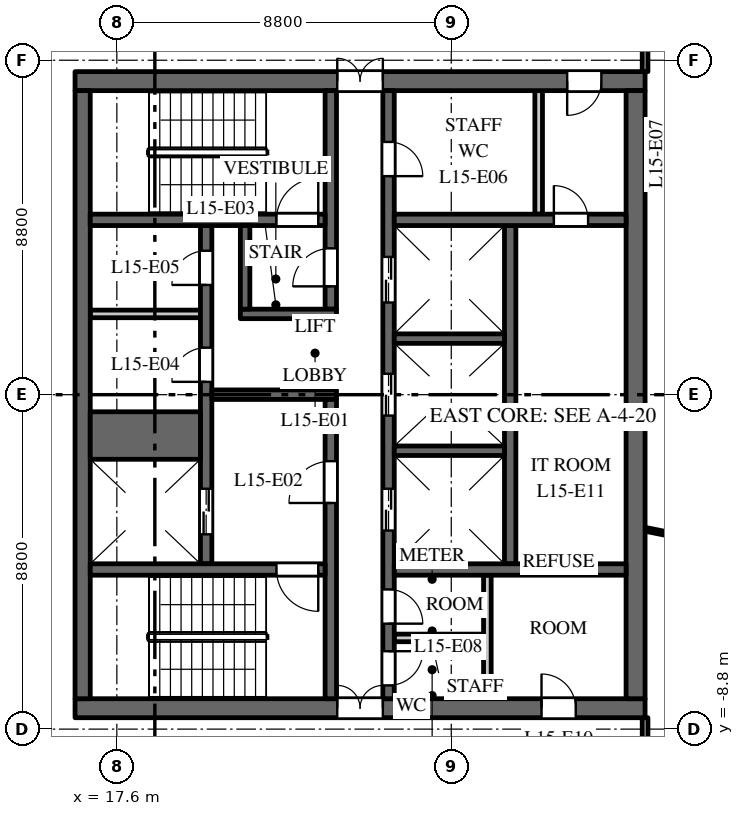
"""IFC4 building model, lengths in metres.
Left out: names, types, materials, properties, quantities, classifications, styles, units other than length and angle.
Written with IfcOpenShell. Run it as: python <this file> out.ifc"""

import sys

from ifc_helpers import new_model, si_unit, direction, frame, frame_2d, origin, place, context, subcontext, project, spatial, rectangle, extrude, element, fill, save


model = new_model("IFC4")
c1 = context("Model", 3, precision=1e-05, world=origin(), true_north=direction((0.0, 1.0)))
c2 = subcontext(c1, "Body", "Model", "MODEL_VIEW")
j1 = project(units=[si_unit("LENGTHUNIT", "METRE"), si_unit("PLANEANGLEUNIT", "RADIAN")], contexts=[c1])
p1 = place(None, origin())
s1 = spatial("IfcSite", under=j1, at=p1, CompositionType="ELEMENT")
p2 = place(p1, origin())
s2 = spatial("IfcBuilding", under=s1, at=p2, CompositionType="ELEMENT")
p3 = place(p2, frame((0.0, 0.0, 70.5)))
s3 = spatial("IfcBuildingStorey", under=s2, at=p3, CompositionType="ELEMENT", Elevation=70.5)
p4 = place(p3, frame((16.5, 8.25, 0.0), z_axis=(0.0, 0.0, 1.0), x_axis=(1.0, 0.0, 0.0)))
e1 = element("IfcWall", 1, at=p4, inside=s3, PredefinedType="SHEAR", context=c2, shape_type="SweptSolid", body=[
    extrude(rectangle(XDim=15.0, YDim=0.5, at=frame_2d((7.5, 0.0))), origin(), (0.0, 0.0, 1.0), 3.7),
])
p5 = place(p4, frame((6.9, 0.0, 0.0)))
e2 = element("IfcOpeningElement", 2, at=p5, cuts=e1, PredefinedType="OPENING", context=c2, shape_type="SweptSolid", body=[
    extrude(rectangle(XDim=1.2, YDim=2.1, at=frame_2d((0.6, 1.05))), frame((0.0, 0.26, 0.0), z_axis=(0.0, -1.0, 0.0), x_axis=(1.0, 0.0, 0.0)), (0.0, 0.0, 1.0), 0.52),
])
p6 = place(p4, frame((12.95, 0.0, 0.0)))
e3 = element("IfcOpeningElement", 3, at=p6, cuts=e1, PredefinedType="OPENING", context=c2, shape_type="SweptSolid", body=[
    extrude(rectangle(XDim=0.9, YDim=2.1, at=frame_2d((0.45, 1.05))), frame((0.0, 0.26, 0.0), z_axis=(0.0, -1.0, 0.0), x_axis=(1.0, 0.0, 0.0)), (0.0, 0.0, 1.0), 0.52),
])
p7 = place(p3, frame((16.5, -8.25, 0.0), z_axis=(0.0, 0.0, 1.0), x_axis=(1.0, 0.0, 0.0)))
e4 = element("IfcWall", 4, at=p7, inside=s3, PredefinedType="SHEAR", context=c2, shape_type="SweptSolid", body=[
    extrude(rectangle(XDim=15.0, YDim=0.5, at=frame_2d((7.5, 0.0))), origin(), (0.0, 0.0, 1.0), 3.7),
])
p8 = place(p7, frame((6.9, 0.0, 0.0)))
e5 = element("IfcOpeningElement", 5, at=p8, cuts=e4, PredefinedType="OPENING", context=c2, shape_type="SweptSolid", body=[
    extrude(rectangle(XDim=1.2, YDim=2.1, at=frame_2d((0.6, 1.05))), frame((0.0, 0.26, 0.0), z_axis=(0.0, -1.0, 0.0), x_axis=(1.0, 0.0, 0.0)), (0.0, 0.0, 1.0), 0.52),
])
p9 = place(p7, frame((12.275, 0.0, 0.0)))
e6 = element("IfcOpeningElement", 6, at=p9, cuts=e4, PredefinedType="OPENING", context=c2, shape_type="SweptSolid", body=[
    extrude(rectangle(XDim=0.9, YDim=2.1, at=frame_2d((0.45, 1.05))), frame((0.0, 0.26, 0.0), z_axis=(0.0, -1.0, 0.0), x_axis=(1.0, 0.0, 0.0)), (0.0, 0.0, 1.0), 0.52),
])
p10 = place(p3, frame((16.9, 2.125, 0.0), z_axis=(0.0, 0.0, 1.0), x_axis=(1.0, 0.0, 0.0)))
e7 = element("IfcWall", 7, at=p10, inside=s3, PredefinedType="PARTITIONING", context=c2, shape_type="SweptSolid", body=[
    extrude(rectangle(XDim=2.9, YDim=0.2, at=frame_2d((1.45, 0.0))), origin(), (0.0, 0.0, 1.0), 3.7),
])
p11 = place(p3, frame((27.95, -4.45, 0.0), z_axis=(0.0, 0.0, 1.0), x_axis=(0.0, 1.0, 0.0)))
e8 = element("IfcWall", 8, at=p11, inside=s3, PredefinedType="SHEAR", context=c2, shape_type="SweptSolid", body=[
    extrude(rectangle(XDim=8.9, YDim=0.3, at=frame_2d((4.45, 0.0))), origin(), (0.0, 0.0, 1.0), 3.7),
])
p12 = place(p3, frame((19.95, -4.45, 0.0), z_axis=(0.0, 0.0, 1.0), x_axis=(0.0, 1.0, 0.0)))
e9 = element("IfcWall", 9, at=p12, inside=s3, PredefinedType="SHEAR", context=c2, shape_type="SweptSolid", body=[
    extrude(rectangle(XDim=8.9, YDim=0.3, at=frame_2d((4.45, 0.0))), origin(), (0.0, 0.0, 1.0), 3.7),
])
p13 = place(p12, frame((0.775, 0.0, 0.0)))
e10 = element("IfcOpeningElement", 10, at=p13, cuts=e9, PredefinedType="OPENING", context=c2, shape_type="SweptSolid", body=[
    extrude(rectangle(XDim=1.2, YDim=2.1, at=frame_2d((0.6, 1.05))), frame((0.0, 0.16, 0.0), z_axis=(0.0, -1.0, 0.0), x_axis=(1.0, 0.0, 0.0)), (0.0, 0.0, 1.0), 0.32),
])
p14 = place(p12, frame((4.788, 0.0, 0.0)))
e11 = element("IfcOpeningElement", 11, at=p14, cuts=e9, PredefinedType="OPENING", context=c2, shape_type="SweptSolid", body=[
    extrude(rectangle(XDim=0.9, YDim=2.1, at=frame_2d((0.45, 1.05))), frame((0.0, 0.16, 0.0), z_axis=(0.0, -1.0, 0.0), x_axis=(1.0, 0.0, 0.0)), (0.0, 0.0, 1.0), 0.32),
])
p15 = place(p12, frame((7.337, 0.0, 0.0)))
e12 = element("IfcOpeningElement", 12, at=p15, cuts=e9, PredefinedType="OPENING", context=c2, shape_type="SweptSolid", body=[
    extrude(rectangle(XDim=0.9, YDim=2.1, at=frame_2d((0.45, 1.05))), frame((0.0, 0.16, 0.0), z_axis=(0.0, -1.0, 0.0), x_axis=(1.0, 0.0, 0.0)), (0.0, 0.0, 1.0), 0.32),
])
p16 = place(p3, frame((24.75, -8.0, 0.0), z_axis=(0.0, 0.0, 1.0), x_axis=(0.0, 1.0, 0.0)))
e13 = element("IfcWall", 13, at=p16, inside=s3, PredefinedType="SHEAR", context=c2, shape_type="SweptSolid", body=[
    extrude(rectangle(XDim=16.0, YDim=0.3, at=frame_2d((8.0, 0.0))), origin(), (0.0, 0.0, 1.0), 3.7),
])
p17 = place(p16, frame((4.425, 0.0, 0.0)))
e14 = element("IfcOpeningElement", 14, at=p17, cuts=e13, PredefinedType="OPENING", context=c2, shape_type="SweptSolid", body=[
    extrude(rectangle(XDim=1.1, YDim=2.1, at=frame_2d((0.55, 1.05))), frame((0.0, 0.16, 0.0), z_axis=(0.0, -1.0, 0.0), x_axis=(1.0, 0.0, 0.0)), (0.0, 0.0, 1.0), 0.32),
])
p18 = place(p16, frame((7.45, 0.0, 0.0)))
e15 = element("IfcOpeningElement", 15, at=p18, cuts=e13, PredefinedType="OPENING", context=c2, shape_type="SweptSolid", body=[
    extrude(rectangle(XDim=1.1, YDim=2.1, at=frame_2d((0.55, 1.05))), frame((0.0, 0.16, 0.0), z_axis=(0.0, -1.0, 0.0), x_axis=(1.0, 0.0, 0.0)), (0.0, 0.0, 1.0), 0.32),
])
p19 = place(p16, frame((10.425, 0.0, 0.0)))
e16 = element("IfcOpeningElement", 16, at=p19, cuts=e13, PredefinedType="OPENING", context=c2, shape_type="SweptSolid", body=[
    extrude(rectangle(XDim=1.2, YDim=2.1, at=frame_2d((0.6, 1.05))), frame((0.0, 0.16, 0.0), z_axis=(0.0, -1.0, 0.0), x_axis=(1.0, 0.0, 0.0)), (0.0, 0.0, 1.0), 0.32),
])
p20 = place(p16, frame((13.75, 0.0, 0.0)))
e17 = element("IfcOpeningElement", 17, at=p20, cuts=e13, PredefinedType="OPENING", context=c2, shape_type="SweptSolid", body=[
    extrude(rectangle(XDim=0.9, YDim=2.1, at=frame_2d((0.45, 1.05))), frame((0.0, 0.16, 0.0), z_axis=(0.0, -1.0, 0.0), x_axis=(1.0, 0.0, 0.0)), (0.0, 0.0, 1.0), 0.32),
])
p21 = place(p16, frame((1.975, 0.0, 0.0)))
e18 = element("IfcOpeningElement", 18, at=p21, cuts=e13, PredefinedType="OPENING", context=c2, shape_type="SweptSolid", body=[
    extrude(rectangle(XDim=0.9, YDim=2.1, at=frame_2d((0.45, 1.05))), frame((0.0, 0.16, 0.0), z_axis=(0.0, -1.0, 0.0), x_axis=(1.0, 0.0, 0.0)), (0.0, 0.0, 1.0), 0.32),
])
p22 = place(p16, frame((0.35, 0.0, 0.0)))
e19 = element("IfcOpeningElement", 19, at=p22, cuts=e13, PredefinedType="OPENING", context=c2, shape_type="SweptSolid", body=[
    extrude(rectangle(XDim=0.9, YDim=2.1, at=frame_2d((0.45, 1.05))), frame((0.0, 0.16, 0.0), z_axis=(0.0, -1.0, 0.0), x_axis=(1.0, 0.0, 0.0)), (0.0, 0.0, 1.0), 0.32),
])
p23 = place(p3, frame((20.1, 0.0, 0.0), z_axis=(0.0, 0.0, 1.0), x_axis=(1.0, 0.0, 0.0)))
e20 = element("IfcWall", 20, at=p23, inside=s3, PredefinedType="SHEAR", context=c2, shape_type="SweptSolid", body=[
    extrude(rectangle(XDim=3.28, YDim=0.25, at=frame_2d((1.64, 0.0))), origin(), (0.0, 0.0, 1.0), 3.7),
])
p24 = place(p3, frame((16.7, -8.0, 0.0), z_axis=(0.0, 0.0, 1.0), x_axis=(0.0, 1.0, 0.0)))
e21 = element("IfcWall", 21, at=p24, inside=s3, PredefinedType="SHEAR", context=c2, shape_type="SweptSolid", body=[
    extrude(rectangle(XDim=16.0, YDim=0.4, at=frame_2d((8.0, 0.0))), origin(), (0.0, 0.0, 1.0), 3.7),
])
p25 = place(p3, frame((31.25, -8.0, 0.0), z_axis=(0.0, 0.0, 1.0), x_axis=(0.0, 1.0, 0.0)))
e22 = element("IfcWall", 22, at=p25, inside=s3, PredefinedType="SHEAR", context=c2, shape_type="SweptSolid", body=[
    extrude(rectangle(XDim=16.0, YDim=0.5, at=frame_2d((8.0, 0.0))), origin(), (0.0, 0.0, 1.0), 3.7),
])
p26 = place(p3, frame((24.9, 4.6, 0.0), z_axis=(0.0, 0.0, 1.0), x_axis=(1.0, 0.0, 0.0)))
e23 = element("IfcWall", 23, at=p26, inside=s3, PredefinedType="SHEAR", context=c2, shape_type="SweptSolid", body=[
    extrude(rectangle(XDim=6.1, YDim=0.3, at=frame_2d((3.05, 0.0))), origin(), (0.0, 0.0, 1.0), 3.7),
])
p27 = place(p26, frame((4.2, 0.0, 0.0)))
e24 = element("IfcOpeningElement", 24, at=p27, cuts=e23, PredefinedType="OPENING", context=c2, shape_type="SweptSolid", body=[
    extrude(rectangle(XDim=0.9, YDim=2.1, at=frame_2d((0.45, 1.05))), frame((0.0, 0.16, 0.0), z_axis=(0.0, -1.0, 0.0), x_axis=(1.0, 0.0, 0.0)), (0.0, 0.0, 1.0), 0.32),
])
for number, where, z_axis, x_axis in (
    (25, (28.7, 4.75, 0.0), (0.0, 0.0, 1.0), (0.0, 1.0, 0.0)),
    (26, (27.35, -8.0, 0.0), (0.0, 0.0, 1.0), (0.0, 1.0, 0.0)),
):
    element("IfcWall", number, at=place(p3, frame(where, z_axis=z_axis, x_axis=x_axis)), inside=s3, PredefinedType="PARTITIONING", context=c2, shape_type="SweptSolid", body=[
        extrude(rectangle(XDim=3.25, YDim=0.2, at=frame_2d((1.625, 0.0))), origin(), (0.0, 0.0, 1.0), 3.7),
    ])
p28 = place(p3, frame((24.9, -6.4, 0.0), z_axis=(0.0, 0.0, 1.0), x_axis=(1.0, 0.0, 0.0)))
e27 = element("IfcWall", 27, at=p28, inside=s3, PredefinedType="PARTITIONING", context=c2, shape_type="SweptSolid", body=[
    extrude(rectangle(XDim=2.35, YDim=0.2, at=frame_2d((1.175, 0.0))), origin(), (0.0, 0.0, 1.0), 3.7),
])
p29 = place(p3, frame((24.9, -4.6, 0.0), z_axis=(0.0, 0.0, 1.0), x_axis=(1.0, 0.0, 0.0)))
e28 = element("IfcWall", 28, at=p29, inside=s3, PredefinedType="SHEAR", context=c2, shape_type="SweptSolid", body=[
    extrude(rectangle(XDim=6.1, YDim=0.3, at=frame_2d((3.05, 0.0))), origin(), (0.0, 0.0, 1.0), 3.7),
])
p30 = place(p3, frame((16.9, -1.075, 0.0), z_axis=(0.0, 0.0, 1.0), x_axis=(1.0, 0.0, 0.0)))
e29 = element("IfcWall", 29, at=p30, inside=s3, PredefinedType="SHEAR", context=c2, shape_type="SweptSolid", body=[
    extrude(rectangle(XDim=2.9, YDim=1.25, at=frame_2d((1.45, 0.0))), origin(), (0.0, 0.0, 1.0), 3.7),
])
for number, where, z_axis, x_axis in (
    (30, (24.9, -1.475, 0.0), (0.0, 0.0, 1.0), (1.0, 0.0, 0.0)),
    (31, (24.9, 1.475, 0.0), (0.0, 0.0, 1.0), (1.0, 0.0, 0.0)),
):
    element("IfcWall", number, at=place(p3, frame(where, z_axis=z_axis, x_axis=x_axis)), inside=s3, PredefinedType="SHEAR", context=c2, shape_type="SweptSolid", body=[
        extrude(rectangle(XDim=2.9, YDim=0.25, at=frame_2d((1.45, 0.0))), origin(), (0.0, 0.0, 1.0), 3.7),
    ])
p31 = place(p3, frame((23.23, 2.25, 0.0), z_axis=(0.0, 0.0, 1.0), x_axis=(0.0, 1.0, 0.0)))
e32 = element("IfcWall", 32, at=p31, inside=s3, PredefinedType="SHEAR", context=c2, shape_type="SweptSolid", body=[
    extrude(rectangle(XDim=5.75, YDim=0.3, at=frame_2d((2.875, 0.0))), origin(), (0.0, 0.0, 1.0), 3.7),
])
p32 = place(p31, frame((0.6, 0.0, 0.0)))
e33 = element("IfcOpeningElement", 33, at=p32, cuts=e32, PredefinedType="OPENING", context=c2, shape_type="SweptSolid", body=[
    extrude(rectangle(XDim=1.0, YDim=2.1, at=frame_2d((0.5, 1.05))), frame((0.0, 0.16, 0.0), z_axis=(0.0, -1.0, 0.0), x_axis=(1.0, 0.0, 0.0)), (0.0, 0.0, 1.0), 0.32),
])
p33 = place(p3, frame((23.23, -8.0, 0.0), z_axis=(0.0, 0.0, 1.0), x_axis=(0.0, 1.0, 0.0)))
e34 = element("IfcWall", 34, at=p33, inside=s3, PredefinedType="SHEAR", context=c2, shape_type="SweptSolid", body=[
    extrude(rectangle(XDim=7.875, YDim=0.3, at=frame_2d((3.938, 0.0))), origin(), (0.0, 0.0, 1.0), 3.7),
])
p34 = place(p33, frame((5.15, 0.0, 0.0)))
e35 = element("IfcOpeningElement", 35, at=p34, cuts=e34, PredefinedType="OPENING", context=c2, shape_type="SweptSolid", body=[
    extrude(rectangle(XDim=1.1, YDim=2.1, at=frame_2d((0.55, 1.05))), frame((0.0, 0.16, 0.0), z_axis=(0.0, -1.0, 0.0), x_axis=(1.0, 0.0, 0.0)), (0.0, 0.0, 1.0), 0.32),
])
p35 = place(p3, frame((16.9, 4.6, 0.0), z_axis=(0.0, 0.0, 1.0), x_axis=(1.0, 0.0, 0.0)))
e36 = element("IfcWall", 36, at=p35, inside=s3, PredefinedType="SHEAR", context=c2, shape_type="SweptSolid", body=[
    extrude(rectangle(XDim=6.18, YDim=0.3, at=frame_2d((3.09, 0.0))), origin(), (0.0, 0.0, 1.0), 3.7),
])
p36 = place(p35, frame((4.9, 0.0, 0.0)))
e37 = element("IfcOpeningElement", 37, at=p36, cuts=e36, PredefinedType="OPENING", context=c2, shape_type="SweptSolid", body=[
    extrude(rectangle(XDim=1.1, YDim=2.1, at=frame_2d((0.55, 1.05))), frame((0.0, 0.16, 0.0), z_axis=(0.0, -1.0, 0.0), x_axis=(1.0, 0.0, 0.0)), (0.0, 0.0, 1.0), 0.32),
])
p37 = place(p3, frame((16.9, -4.6, 0.0), z_axis=(0.0, 0.0, 1.0), x_axis=(1.0, 0.0, 0.0)))
e38 = element("IfcWall", 38, at=p37, inside=s3, PredefinedType="SHEAR", context=c2, shape_type="SweptSolid", body=[
    extrude(rectangle(XDim=6.18, YDim=0.3, at=frame_2d((3.09, 0.0))), origin(), (0.0, 0.0, 1.0), 3.7),
])
p38 = place(p37, frame((4.9, 0.0, 0.0)))
e39 = element("IfcOpeningElement", 39, at=p38, cuts=e38, PredefinedType="OPENING", context=c2, shape_type="SweptSolid", body=[
    extrude(rectangle(XDim=1.1, YDim=2.1, at=frame_2d((0.55, 1.05))), frame((0.0, 0.16, 0.0), z_axis=(0.0, -1.0, 0.0), x_axis=(1.0, 0.0, 0.0)), (0.0, 0.0, 1.0), 0.32),
])
p39 = place(p3, frame((20.85, 2.125, 0.0), z_axis=(0.0, 0.0, 1.0), x_axis=(1.0, 0.0, 0.0)))
e40 = element("IfcWall", 40, at=p39, inside=s3, PredefinedType="SHEAR", context=c2, shape_type="SweptSolid", body=[
    extrude(rectangle(XDim=2.53, YDim=0.25, at=frame_2d((1.265, 0.0))), origin(), (0.0, 0.0, 1.0), 3.7),
])
p40 = place(p3, frame((20.975, 2.25, 0.0), z_axis=(0.0, 0.0, 1.0), x_axis=(0.0, 1.0, 0.0)))
e41 = element("IfcWall", 41, at=p40, inside=s3, PredefinedType="SHEAR", context=c2, shape_type="SweptSolid", body=[
    extrude(rectangle(XDim=2.2, YDim=0.25, at=frame_2d((1.1, 0.0))), origin(), (0.0, 0.0, 1.0), 3.7),
])
p41 = place(p3, frame((31.5, -10.7, 0.0), z_axis=(0.0, 0.0, 1.0), x_axis=(0.0, 1.0, 0.0)))
e42 = element("IfcWall", 42, at=p41, inside=s3, PredefinedType="PARTITIONING", context=c2, shape_type="SweptSolid", body=[
    extrude(rectangle(XDim=2.2, YDim=0.15, at=frame_2d((1.1, 0.0))), origin(), (0.0, 0.0, 1.0), 2.85),
])
p42 = place(p41, frame((0.65, 0.0, 0.0)))
e43 = element("IfcOpeningElement", 43, at=p42, cuts=e42, PredefinedType="OPENING", context=c2, shape_type="SweptSolid", body=[
    extrude(rectangle(XDim=1.0, YDim=2.1, at=frame_2d((0.5, 1.05))), frame((0.0, 0.085, 0.0), z_axis=(0.0, -1.0, 0.0), x_axis=(1.0, 0.0, 0.0)), (0.0, 0.0, 1.0), 0.17),
])
p43 = place(p3, frame((31.5, -3.542, 0.0), z_axis=(0.0, 0.0, 1.0), x_axis=(0.980357474535, -0.197228857227, 0.0)))
e44 = element("IfcWall", 44, at=p43, inside=s3, PredefinedType="PARTITIONING", context=c2, shape_type="SweptSolid", body=[
    extrude(rectangle(XDim=4.092, YDim=0.1, at=frame_2d((2.046, 0.0))), origin(), (0.0, 0.0, 1.0), 2.85),
])
p44 = place(p3, frame((31.5, 8.5, 0.0), z_axis=(0.0, 0.0, 1.0), x_axis=(0.0, 1.0, 0.0)))
e45 = element("IfcWall", 45, at=p44, inside=s3, PredefinedType="PARTITIONING", context=c2, shape_type="SweptSolid", body=[
    extrude(rectangle(XDim=2.2, YDim=0.15, at=frame_2d((1.1, 0.0))), origin(), (0.0, 0.0, 1.0), 2.85),
])
p45 = place(p44, frame((0.65, 0.0, 0.0)))
e46 = element("IfcOpeningElement", 46, at=p45, cuts=e45, PredefinedType="OPENING", context=c2, shape_type="SweptSolid", body=[
    extrude(rectangle(XDim=1.0, YDim=2.1, at=frame_2d((0.5, 1.05))), frame((0.0, 0.085, 0.0), z_axis=(0.0, -1.0, 0.0), x_axis=(1.0, 0.0, 0.0)), (0.0, 0.0, 1.0), 0.17),
])
p46 = place(p13, origin())
e47 = element("IfcDoor", 47, at=p46, inside=s3, OperationType="DOUBLE_DOOR_SLIDING", PredefinedType="DOOR", context=c2, shape_type="SweptSolid", body=[
    extrude(rectangle(XDim=1.2, YDim=2.1, at=frame_2d((0.6, 1.05))), frame((0.0, 0.025, 0.0), z_axis=(0.0, -1.0, 0.0), x_axis=(1.0, 0.0, 0.0)), (0.0, 0.0, 1.0), 0.05),
])
fill(e10, e47)
p47 = place(p17, origin())
e48 = element("IfcDoor", 48, at=p47, inside=s3, OperationType="DOUBLE_DOOR_SLIDING", PredefinedType="DOOR", context=c2, shape_type="SweptSolid", body=[
    extrude(rectangle(XDim=1.1, YDim=2.1, at=frame_2d((0.55, 1.05))), frame((0.0, 0.025, 0.0), z_axis=(0.0, -1.0, 0.0), x_axis=(1.0, 0.0, 0.0)), (0.0, 0.0, 1.0), 0.05),
])
fill(e14, e48)
p48 = place(p18, origin())
e49 = element("IfcDoor", 49, at=p48, inside=s3, OperationType="DOUBLE_DOOR_SLIDING", PredefinedType="DOOR", context=c2, shape_type="SweptSolid", body=[
    extrude(rectangle(XDim=1.1, YDim=2.1, at=frame_2d((0.55, 1.05))), frame((0.0, 0.025, 0.0), z_axis=(0.0, -1.0, 0.0), x_axis=(1.0, 0.0, 0.0)), (0.0, 0.0, 1.0), 0.05),
])
fill(e15, e49)
p49 = place(p19, origin())
e50 = element("IfcDoor", 50, at=p49, inside=s3, OperationType="DOUBLE_DOOR_SLIDING", PredefinedType="DOOR", context=c2, shape_type="SweptSolid", body=[
    extrude(rectangle(XDim=1.2, YDim=2.1, at=frame_2d((0.6, 1.05))), frame((0.0, 0.025, 0.0), z_axis=(0.0, -1.0, 0.0), x_axis=(1.0, 0.0, 0.0)), (0.0, 0.0, 1.0), 0.05),
])
fill(e16, e50)
p50 = place(p36, origin())
e51 = element("IfcDoor", 51, at=p50, inside=s3, OperationType="SINGLE_SWING_LEFT", PredefinedType="DOOR", context=c2, shape_type="SweptSolid", body=[
    extrude(rectangle(XDim=1.1, YDim=2.1, at=frame_2d((0.55, 1.05))), frame((0.0, 0.025, 0.0), z_axis=(0.0, -1.0, 0.0), x_axis=(1.0, 0.0, 0.0)), (0.0, 0.0, 1.0), 0.05),
])
fill(e37, e51)
p51 = place(p38, origin())
e52 = element("IfcDoor", 52, at=p51, inside=s3, OperationType="SINGLE_SWING_RIGHT", PredefinedType="DOOR", context=c2, shape_type="SweptSolid", body=[
    extrude(rectangle(XDim=1.1, YDim=2.1, at=frame_2d((0.55, 1.05))), frame((0.0, 0.025, 0.0), z_axis=(0.0, -1.0, 0.0), x_axis=(1.0, 0.0, 0.0)), (0.0, 0.0, 1.0), 0.05),
])
fill(e39, e52)
p52 = place(p34, origin())
e53 = element("IfcDoor", 53, at=p52, inside=s3, OperationType="SINGLE_SWING_RIGHT", PredefinedType="DOOR", context=c2, shape_type="SweptSolid", body=[
    extrude(rectangle(XDim=1.1, YDim=2.1, at=frame_2d((0.55, 1.05))), frame((0.0, 0.025, 0.0), z_axis=(0.0, -1.0, 0.0), x_axis=(1.0, 0.0, 0.0)), (0.0, 0.0, 1.0), 0.05),
])
fill(e35, e53)
p53 = place(p32, origin())
e54 = element("IfcDoor", 54, at=p53, inside=s3, OperationType="SINGLE_SWING_RIGHT", PredefinedType="DOOR", context=c2, shape_type="SweptSolid", body=[
    extrude(rectangle(XDim=1.0, YDim=2.1, at=frame_2d((0.5, 1.05))), frame((0.0, 0.025, 0.0), z_axis=(0.0, -1.0, 0.0), x_axis=(1.0, 0.0, 0.0)), (0.0, 0.0, 1.0), 0.05),
])
fill(e33, e54)
p54 = place(p5, origin())
e55 = element("IfcDoor", 55, at=p54, inside=s3, OperationType="DOUBLE_DOOR_DOUBLE_SWING", PredefinedType="DOOR", context=c2, shape_type="SweptSolid", body=[
    extrude(rectangle(XDim=1.2, YDim=2.1, at=frame_2d((0.6, 1.05))), frame((0.0, 0.025, 0.0), z_axis=(0.0, -1.0, 0.0), x_axis=(1.0, 0.0, 0.0)), (0.0, 0.0, 1.0), 0.05),
])
fill(e2, e55)
p55 = place(p8, origin())
e56 = element("IfcDoor", 56, at=p55, inside=s3, OperationType="DOUBLE_DOOR_DOUBLE_SWING", PredefinedType="DOOR", context=c2, shape_type="SweptSolid", body=[
    extrude(rectangle(XDim=1.2, YDim=2.1, at=frame_2d((0.6, 1.05))), frame((0.0, 0.025, 0.0), z_axis=(0.0, -1.0, 0.0), x_axis=(1.0, 0.0, 0.0)), (0.0, 0.0, 1.0), 0.05),
])
fill(e5, e56)
p56 = place(p14, origin())
e57 = element("IfcDoor", 57, at=p56, inside=s3, OperationType="SINGLE_SWING_RIGHT", PredefinedType="DOOR", context=c2, shape_type="SweptSolid", body=[
    extrude(rectangle(XDim=0.9, YDim=2.1, at=frame_2d((0.45, 1.05))), frame((0.0, 0.025, 0.0), z_axis=(0.0, -1.0, 0.0), x_axis=(1.0, 0.0, 0.0)), (0.0, 0.0, 1.0), 0.05),
])
fill(e11, e57)
p57 = place(p15, origin())
e58 = element("IfcDoor", 58, at=p57, inside=s3, OperationType="SINGLE_SWING_RIGHT", PredefinedType="DOOR", context=c2, shape_type="SweptSolid", body=[
    extrude(rectangle(XDim=0.9, YDim=2.1, at=frame_2d((0.45, 1.05))), frame((0.0, 0.025, 0.0), z_axis=(0.0, -1.0, 0.0), x_axis=(1.0, 0.0, 0.0)), (0.0, 0.0, 1.0), 0.05),
])
fill(e12, e58)
p58 = place(p20, origin())
e59 = element("IfcDoor", 59, at=p58, inside=s3, OperationType="SINGLE_SWING_LEFT", PredefinedType="DOOR", context=c2, shape_type="SweptSolid", body=[
    extrude(rectangle(XDim=0.9, YDim=2.1, at=frame_2d((0.45, 1.05))), frame((0.0, 0.025, 0.0), z_axis=(0.0, -1.0, 0.0), x_axis=(1.0, 0.0, 0.0)), (0.0, 0.0, 1.0), 0.05),
])
fill(e17, e59)
p59 = place(p6, origin())
e60 = element("IfcDoor", 60, at=p59, inside=s3, OperationType="SINGLE_SWING_LEFT", PredefinedType="DOOR", context=c2, shape_type="SweptSolid", body=[
    extrude(rectangle(XDim=0.9, YDim=2.1, at=frame_2d((0.45, 1.05))), frame((0.0, 0.025, 0.0), z_axis=(0.0, -1.0, 0.0), x_axis=(1.0, 0.0, 0.0)), (0.0, 0.0, 1.0), 0.05),
])
fill(e3, e60)
p60 = place(p21, origin())
e61 = element("IfcDoor", 61, at=p60, inside=s3, OperationType="SINGLE_SWING_LEFT", PredefinedType="DOOR", context=c2, shape_type="SweptSolid", body=[
    extrude(rectangle(XDim=0.9, YDim=2.1, at=frame_2d((0.45, 1.05))), frame((0.0, 0.025, 0.0), z_axis=(0.0, -1.0, 0.0), x_axis=(1.0, 0.0, 0.0)), (0.0, 0.0, 1.0), 0.05),
])
fill(e18, e61)
p61 = place(p22, origin())
e62 = element("IfcDoor", 62, at=p61, inside=s3, OperationType="SINGLE_SWING_RIGHT", PredefinedType="DOOR", context=c2, shape_type="SweptSolid", body=[
    extrude(rectangle(XDim=0.9, YDim=2.1, at=frame_2d((0.45, 1.05))), frame((0.0, 0.025, 0.0), z_axis=(0.0, -1.0, 0.0), x_axis=(1.0, 0.0, 0.0)), (0.0, 0.0, 1.0), 0.05),
])
fill(e19, e62)
p62 = place(p9, origin())
e63 = element("IfcDoor", 63, at=p62, inside=s3, OperationType="SINGLE_SWING_RIGHT", PredefinedType="DOOR", context=c2, shape_type="SweptSolid", body=[
    extrude(rectangle(XDim=0.9, YDim=2.1, at=frame_2d((0.45, 1.05))), frame((0.0, 0.025, 0.0), z_axis=(0.0, -1.0, 0.0), x_axis=(1.0, 0.0, 0.0)), (0.0, 0.0, 1.0), 0.05),
])
fill(e6, e63)
p63 = place(p27, origin())
e64 = element("IfcDoor", 64, at=p63, inside=s3, OperationType="SINGLE_SWING_RIGHT", PredefinedType="DOOR", context=c2, shape_type="SweptSolid", body=[
    extrude(rectangle(XDim=0.9, YDim=2.1, at=frame_2d((0.45, 1.05))), frame((0.0, 0.025, 0.0), z_axis=(0.0, -1.0, 0.0), x_axis=(1.0, 0.0, 0.0)), (0.0, 0.0, 1.0), 0.05),
])
fill(e24, e64)
save(model, sys.argv[1])
